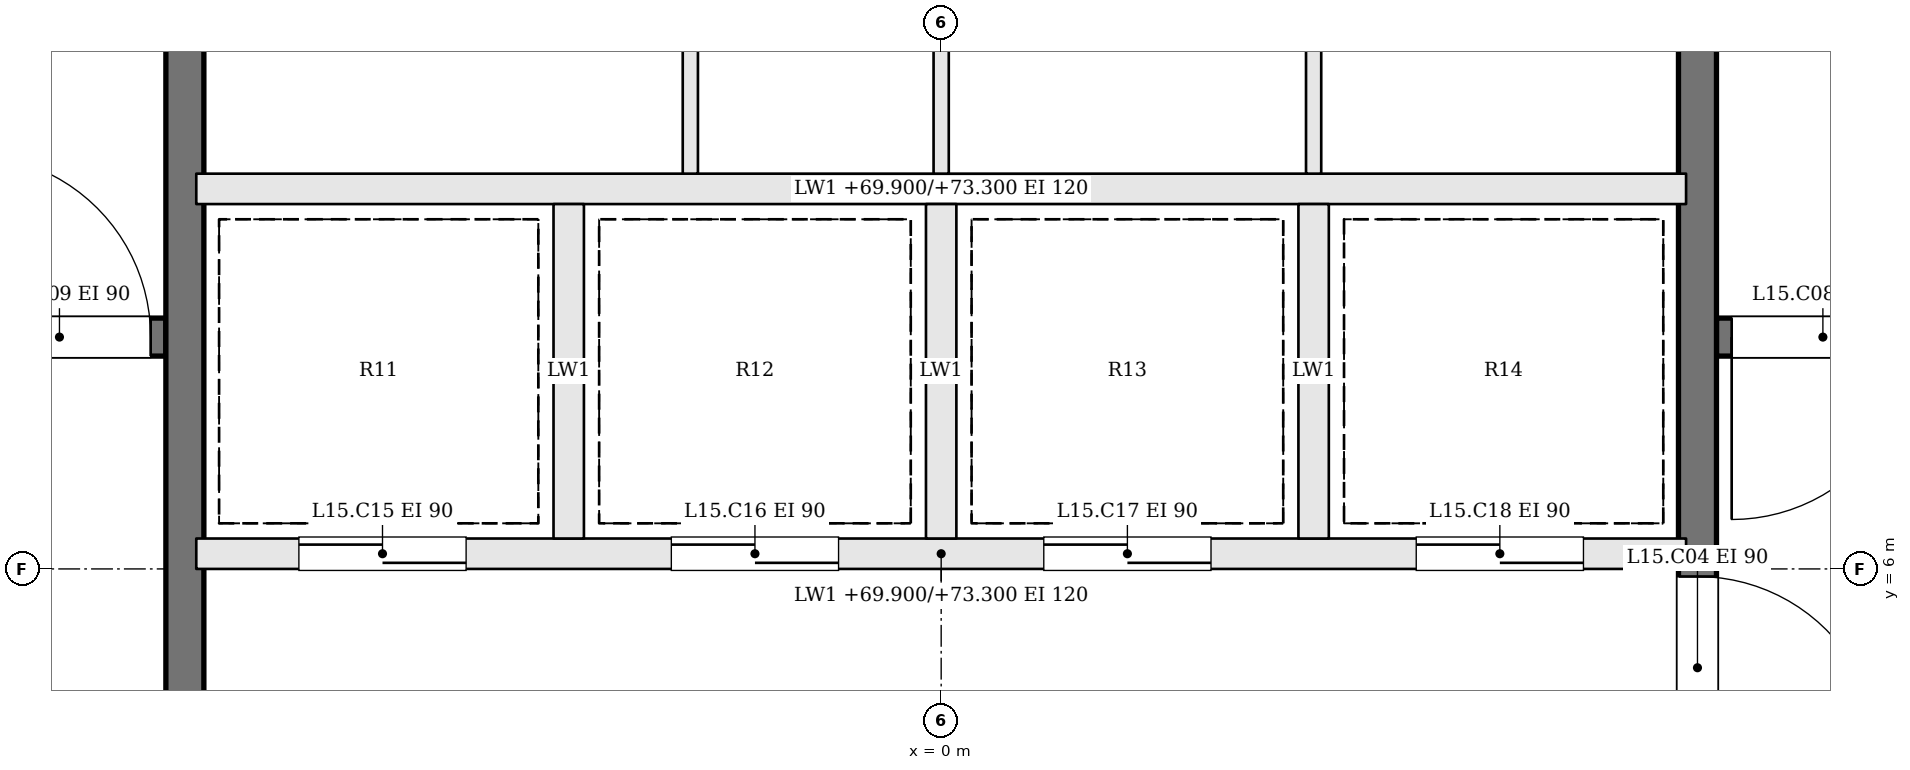
"""IFC4 building model, lengths in metres.
Left out: names, types, materials, properties, quantities, classifications, styles, units other than length and angle.
Written with IfcOpenShell. Run it as: python <this file> out.ifc"""

import sys

from ifc_helpers import new_model, si_unit, direction, frame, frame_2d, origin, place, context, subcontext, project, spatial, rectangle, extrude, element, fill, save


model = new_model("IFC4")
c1 = context("Model", 3, precision=1e-05, world=origin(), true_north=direction((0.0, 1.0)))
c2 = subcontext(c1, "Body", "Model", "MODEL_VIEW")
j1 = project(units=[si_unit("LENGTHUNIT", "METRE"), si_unit("PLANEANGLEUNIT", "RADIAN")], contexts=[c1])
p1 = place(None, origin())
s1 = spatial("IfcSite", under=j1, at=p1, CompositionType="ELEMENT")
p2 = place(p1, origin())
s2 = spatial("IfcBuilding", under=s1, at=p2, CompositionType="ELEMENT")
p3 = place(p2, frame((0.0, 0.0, 69.9)))
s3 = spatial("IfcBuildingStorey", under=s2, at=p3, CompositionType="ELEMENT", Elevation=69.9)
p4 = place(p3, frame((11.6, 7.525, 0.0), z_axis=(0.0, 0.0, 1.0), x_axis=(-1.0, 0.0, 0.0)))
e1 = element("IfcWall", 1, at=p4, inside=s3, PredefinedType="SOLIDWALL", context=c2, shape_type="SweptSolid", body=[
    extrude(rectangle(XDim=6.5, YDim=0.25, at=frame_2d((3.25, 0.0))), origin(), (0.0, 0.0, 1.0), 3.4),
])
p5 = place(p4, frame((5.2, 0.0, 0.0)))
e2 = element("IfcOpeningElement", 2, at=p5, cuts=e1, PredefinedType="OPENING", context=c2, shape_type="SweptSolid", body=[
    extrude(rectangle(XDim=1.2, YDim=2.1, at=frame_2d((0.6, 1.05))), frame((0.0, 0.135, 0.0), z_axis=(0.0, -1.0, 0.0), x_axis=(1.0, 0.0, 0.0)), (0.0, 0.0, 1.0), 0.27),
])
p6 = place(p3, frame((-11.6, 7.525, 0.0), z_axis=(0.0, 0.0, 1.0), x_axis=(1.0, 0.0, 0.0)))
e3 = element("IfcWall", 3, at=p6, inside=s3, PredefinedType="SOLIDWALL", context=c2, shape_type="SweptSolid", body=[
    extrude(rectangle(XDim=6.5, YDim=0.25, at=frame_2d((3.25, 0.0))), origin(), (0.0, 0.0, 1.0), 3.4),
])
p7 = place(p6, frame((5.2, 0.0, 0.0)))
e4 = element("IfcOpeningElement", 4, at=p7, cuts=e3, PredefinedType="OPENING", context=c2, shape_type="SweptSolid", body=[
    extrude(rectangle(XDim=1.2, YDim=2.1, at=frame_2d((0.6, 1.05))), frame((0.0, 0.135, 0.0), z_axis=(0.0, -1.0, 0.0), x_axis=(1.0, 0.0, 0.0)), (0.0, 0.0, 1.0), 0.27),
])
p8 = place(p3, frame((-4.975, -1.6, 0.0), z_axis=(0.0, 0.0, 1.0), x_axis=(0.0, 1.0, 0.0)))
e5 = element("IfcWall", 5, at=p8, inside=s3, PredefinedType="SOLIDWALL", context=c2, shape_type="SweptSolid", body=[
    extrude(rectangle(XDim=12.2, YDim=0.25, at=frame_2d((6.1, 0.0))), origin(), (0.0, 0.0, 1.0), 3.4),
])
p9 = place(p8, frame((4.65, 0.0, 0.0)))
e6 = element("IfcOpeningElement", 6, at=p9, cuts=e5, PredefinedType="OPENING", context=c2, shape_type="SweptSolid", body=[
    extrude(rectangle(XDim=1.2, YDim=2.1, at=frame_2d((0.6, 1.05))), frame((0.0, 0.135, 0.0), z_axis=(0.0, -1.0, 0.0), x_axis=(1.0, 0.0, 0.0)), (0.0, 0.0, 1.0), 0.27),
])
p10 = place(p3, frame((4.975, 10.6, 0.0), z_axis=(0.0, 0.0, 1.0), x_axis=(0.0, -1.0, 0.0)))
e7 = element("IfcWall", 7, at=p10, inside=s3, PredefinedType="SOLIDWALL", context=c2, shape_type="SweptSolid", body=[
    extrude(rectangle(XDim=12.2, YDim=0.25, at=frame_2d((6.1, 0.0))), origin(), (0.0, 0.0, 1.0), 3.4),
])
p11 = place(p10, frame((4.65, 0.0, 0.0)))
e8 = element("IfcOpeningElement", 8, at=p11, cuts=e7, PredefinedType="OPENING", context=c2, shape_type="SweptSolid", body=[
    extrude(rectangle(XDim=1.2, YDim=2.1, at=frame_2d((0.6, 1.05))), frame((0.0, 0.135, 0.0), z_axis=(0.0, -1.0, 0.0), x_axis=(1.0, 0.0, 0.0)), (0.0, 0.0, 1.0), 0.27),
])
p12 = place(p3, frame((-4.9, 6.1, 0.0), z_axis=(0.0, 0.0, 1.0), x_axis=(1.0, 0.0, 0.0)))
e9 = element("IfcWall", 9, at=p12, inside=s3, PredefinedType="SOLIDWALL", context=c2, shape_type="SweptSolid", body=[
    extrude(rectangle(XDim=9.8, YDim=0.2, at=frame_2d((4.9, 0.0))), origin(), (0.0, 0.0, 1.0), 3.4),
])
p13 = place(p12, frame((0.675, 0.0, 0.0)))
e10 = element("IfcOpeningElement", 10, at=p13, cuts=e9, PredefinedType="OPENING", context=c2, shape_type="SweptSolid", body=[
    extrude(rectangle(XDim=1.1, YDim=2.1, at=frame_2d((0.55, 1.05))), frame((0.0, 0.11, 0.0), z_axis=(0.0, -1.0, 0.0), x_axis=(1.0, 0.0, 0.0)), (0.0, 0.0, 1.0), 0.22),
])
p14 = place(p12, frame((3.125, 0.0, 0.0)))
e11 = element("IfcOpeningElement", 11, at=p14, cuts=e9, PredefinedType="OPENING", context=c2, shape_type="SweptSolid", body=[
    extrude(rectangle(XDim=1.1, YDim=2.1, at=frame_2d((0.55, 1.05))), frame((0.0, 0.11, 0.0), z_axis=(0.0, -1.0, 0.0), x_axis=(1.0, 0.0, 0.0)), (0.0, 0.0, 1.0), 0.22),
])
p15 = place(p12, frame((5.575, 0.0, 0.0)))
e12 = element("IfcOpeningElement", 12, at=p15, cuts=e9, PredefinedType="OPENING", context=c2, shape_type="SweptSolid", body=[
    extrude(rectangle(XDim=1.1, YDim=2.1, at=frame_2d((0.55, 1.05))), frame((0.0, 0.11, 0.0), z_axis=(0.0, -1.0, 0.0), x_axis=(1.0, 0.0, 0.0)), (0.0, 0.0, 1.0), 0.22),
])
p16 = place(p12, frame((8.025, 0.0, 0.0)))
e13 = element("IfcOpeningElement", 13, at=p16, cuts=e9, PredefinedType="OPENING", context=c2, shape_type="SweptSolid", body=[
    extrude(rectangle(XDim=1.1, YDim=2.1, at=frame_2d((0.55, 1.05))), frame((0.0, 0.11, 0.0), z_axis=(0.0, -1.0, 0.0), x_axis=(1.0, 0.0, 0.0)), (0.0, 0.0, 1.0), 0.22),
])
p17 = place(p3, frame((-4.9, 8.5, 0.0), z_axis=(0.0, 0.0, 1.0), x_axis=(1.0, 0.0, 0.0)))
e14 = element("IfcWall", 14, at=p17, inside=s3, PredefinedType="SOLIDWALL", context=c2, shape_type="SweptSolid", body=[
    extrude(rectangle(XDim=9.8, YDim=0.2, at=frame_2d((4.9, 0.0))), origin(), (0.0, 0.0, 1.0), 3.4),
])
for number, where, z_axis, x_axis in (
    (15, (-2.45, 6.2, 0.0), (0.0, 0.0, 1.0), (0.0, 1.0, 0.0)),
    (16, (0.0, 6.2, 0.0), (0.0, 0.0, 1.0), (0.0, 1.0, 0.0)),
    (17, (2.45, 6.2, 0.0), (0.0, 0.0, 1.0), (0.0, 1.0, 0.0)),
):
    element("IfcWall", number, at=place(p3, frame(where, z_axis=z_axis, x_axis=x_axis)), inside=s3, PredefinedType="SOLIDWALL", context=c2, shape_type="SweptSolid", body=[
        extrude(rectangle(XDim=2.2, YDim=0.2, at=frame_2d((1.1, 0.0))), origin(), (0.0, 0.0, 1.0), 3.4),
    ])
for number, where, z_axis, x_axis in (
    (18, (-1.65, 8.6, 0.0), (0.0, 0.0, 1.0), (0.0, 1.0, 0.0)),
    (19, (0.0, 8.6, 0.0), (0.0, 0.0, 1.0), (0.0, 1.0, 0.0)),
    (20, (2.45, 8.6, 0.0), (0.0, 0.0, 1.0), (0.0, 1.0, 0.0)),
):
    element("IfcWall", number, at=place(p3, frame(where, z_axis=z_axis, x_axis=x_axis)), inside=s3, PredefinedType="PARTITIONING", context=c2, shape_type="SweptSolid", body=[
        extrude(rectangle(XDim=2.0, YDim=0.1, at=frame_2d((1.0, 0.0))), origin(), (0.0, 0.0, 1.0), 3.4),
    ])
p18 = place(p11, origin())
e21 = element("IfcDoor", 21, at=p18, inside=s3, OperationType="SINGLE_SWING_RIGHT", PredefinedType="DOOR", context=c2, shape_type="SweptSolid", body=[
    extrude(rectangle(XDim=1.2, YDim=2.1, at=frame_2d((0.6, 1.05))), frame((0.0, 0.025, 0.0), z_axis=(0.0, -1.0, 0.0), x_axis=(1.0, 0.0, 0.0)), (0.0, 0.0, 1.0), 0.05),
])
fill(e8, e21)
p19 = place(p5, origin())
e22 = element("IfcDoor", 22, at=p19, inside=s3, OperationType="SINGLE_SWING_RIGHT", PredefinedType="DOOR", context=c2, shape_type="SweptSolid", body=[
    extrude(rectangle(XDim=1.2, YDim=2.1, at=frame_2d((0.6, 1.05))), frame((0.0, 0.025, 0.0), z_axis=(0.0, -1.0, 0.0), x_axis=(1.0, 0.0, 0.0)), (0.0, 0.0, 1.0), 0.05),
])
fill(e2, e22)
p20 = place(p7, origin())
e23 = element("IfcDoor", 23, at=p20, inside=s3, OperationType="SINGLE_SWING_LEFT", PredefinedType="DOOR", context=c2, shape_type="SweptSolid", body=[
    extrude(rectangle(XDim=1.2, YDim=2.1, at=frame_2d((0.6, 1.05))), frame((0.0, 0.025, 0.0), z_axis=(0.0, -1.0, 0.0), x_axis=(1.0, 0.0, 0.0)), (0.0, 0.0, 1.0), 0.05),
])
fill(e4, e23)
p21 = place(p13, origin())
e24 = element("IfcDoor", 24, at=p21, inside=s3, OperationType="SLIDING_TO_RIGHT", PredefinedType="DOOR", context=c2, shape_type="SweptSolid", body=[
    extrude(rectangle(XDim=1.1, YDim=2.1, at=frame_2d((0.55, 1.05))), frame((0.0, 0.025, 0.0), z_axis=(0.0, -1.0, 0.0), x_axis=(1.0, 0.0, 0.0)), (0.0, 0.0, 1.0), 0.05),
])
fill(e10, e24)
p22 = place(p14, origin())
e25 = element("IfcDoor", 25, at=p22, inside=s3, OperationType="SLIDING_TO_LEFT", PredefinedType="DOOR", context=c2, shape_type="SweptSolid", body=[
    extrude(rectangle(XDim=1.1, YDim=2.1, at=frame_2d((0.55, 1.05))), frame((0.0, 0.025, 0.0), z_axis=(0.0, -1.0, 0.0), x_axis=(1.0, 0.0, 0.0)), (0.0, 0.0, 1.0), 0.05),
])
fill(e11, e25)
p23 = place(p15, origin())
e26 = element("IfcDoor", 26, at=p23, inside=s3, OperationType="SLIDING_TO_RIGHT", PredefinedType="DOOR", context=c2, shape_type="SweptSolid", body=[
    extrude(rectangle(XDim=1.1, YDim=2.1, at=frame_2d((0.55, 1.05))), frame((0.0, 0.025, 0.0), z_axis=(0.0, -1.0, 0.0), x_axis=(1.0, 0.0, 0.0)), (0.0, 0.0, 1.0), 0.05),
])
fill(e12, e26)
p24 = place(p16, origin())
e27 = element("IfcDoor", 27, at=p24, inside=s3, OperationType="SLIDING_TO_LEFT", PredefinedType="DOOR", context=c2, shape_type="SweptSolid", body=[
    extrude(rectangle(XDim=1.1, YDim=2.1, at=frame_2d((0.55, 1.05))), frame((0.0, 0.025, 0.0), z_axis=(0.0, -1.0, 0.0), x_axis=(1.0, 0.0, 0.0)), (0.0, 0.0, 1.0), 0.05),
])
fill(e13, e27)
save(model, sys.argv[1])
